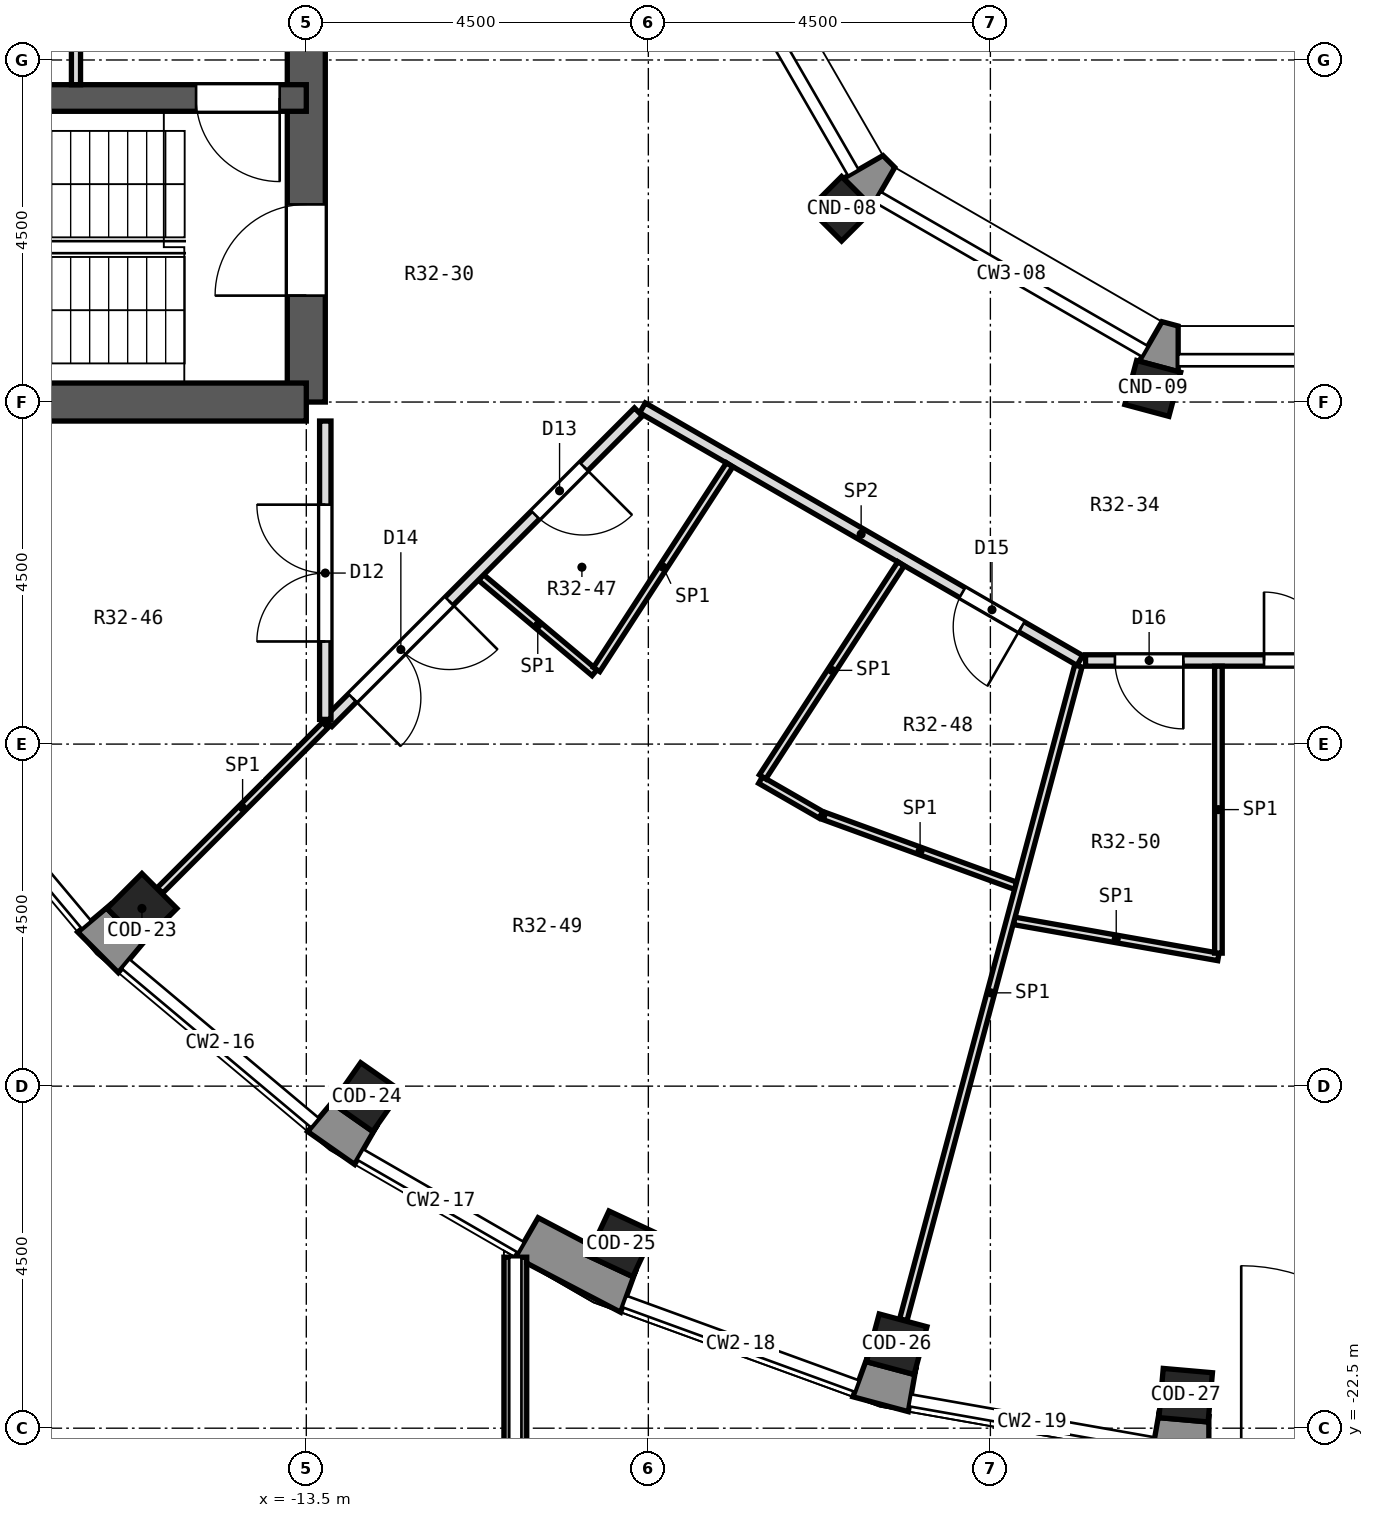
"""IFC4 building model, lengths in metres.
Left out: names, types, materials, properties, quantities, classifications, styles, units other than length and angle.
Written with IfcOpenShell. Run it as: python <this file> out.ifc"""

import sys

from ifc_helpers import new_model, si_unit, direction, frame, frame_2d, origin, origin_2d, place, context, subcontext, project, spatial, polyline, rectangle, outline, extrude, element, fill, save


model = new_model("IFC4")
c1 = context("Model", 3, precision=1e-05, world=origin(), true_north=direction((0.0, 1.0)))
c2 = subcontext(c1, "Body", "Model", "MODEL_VIEW")
j1 = project(units=[si_unit("LENGTHUNIT", "METRE"), si_unit("PLANEANGLEUNIT", "RADIAN")], contexts=[c1])
p1 = place(None, origin())
s1 = spatial("IfcSite", under=j1, at=p1, CompositionType="ELEMENT")
p2 = place(p1, origin())
s2 = spatial("IfcBuilding", under=s1, at=p2, CompositionType="ELEMENT")
p3 = place(p2, frame((0.0, 0.0, 224.7)))
s3 = spatial("IfcBuildingStorey", under=s2, at=p3, CompositionType="ELEMENT", Elevation=224.7)
p4 = place(p3, frame((-10.75, -29.512, 0.0), z_axis=(0.0, 0.0, 1.0), x_axis=(0.0, 1.0, 0.0)))
e1 = element("IfcWall", 1, at=p4, inside=s3, PredefinedType="SOLIDWALL", context=c2, shape_type="SweptSolid", body=[
    extrude(rectangle(XDim=9.262, YDim=0.3, at=frame_2d((4.631, 0.0))), origin(), (0.0, 0.0, 1.0), 1.7),
])
for number, where, z_axis, x_axis in (
    (2, (-15.662, -15.662, -0.55), (0.0, 0.0, 1.0), (-0.707, -0.707, 0.0)),
    (3, (-12.705, -18.144, -0.55), (0.0, 0.0, 1.0), (-0.574, -0.819, 0.0)),
):
    element("IfcColumn", number, at=place(p3, frame(where, z_axis=z_axis, x_axis=x_axis)), inside=s3, PredefinedType="COLUMN", context=c2, shape_type="SweptSolid", body=[
        extrude(rectangle(XDim=0.65, YDim=0.65, at=origin_2d()), origin(), (0.0, 0.0, 1.0), 5.55),
    ])
for number, where, z_axis, x_axis in (
    (4, (-9.361, -20.075, -1.15), (0.0, 0.0, 1.0), (-0.423, -0.906, 0.0)),
    (5, (-5.733, -21.395, -1.15), (0.0, 0.0, 1.0), (-0.259, -0.966, 0.0)),
    (6, (-1.93, -22.066, -1.15), (0.0, 0.0, 1.0), (-0.087, -0.996, 0.0)),
):
    element("IfcColumn", number, at=place(p3, frame(where, z_axis=z_axis, x_axis=x_axis)), inside=s3, PredefinedType="COLUMN", context=c2, shape_type="SweptSolid", body=[
        extrude(rectangle(XDim=0.65, YDim=0.65, at=origin_2d()), origin(), (0.0, 0.0, 1.0), 6.15),
    ])
for number, where, z_axis, x_axis in (
    (7, (-6.458, -6.458, 0.0), (0.0, 0.0, 1.0), (-0.707, -0.707, 0.0)),
    (8, (-2.364, -8.821, 0.0), (0.0, 0.0, 1.0), (-0.259, -0.966, 0.0)),
):
    element("IfcColumn", number, at=place(p3, frame(where, z_axis=z_axis, x_axis=x_axis)), inside=s3, PredefinedType="COLUMN", context=c2, shape_type="SweptSolid", body=[
        extrude(rectangle(XDim=0.6, YDim=0.6, at=origin_2d()), origin(), (0.0, 0.0, 1.0), 5.0),
    ])
p5 = place(p3, frame((-13.5, -9.0, 0.0), z_axis=(0.0, 0.0, 1.0), x_axis=(0.0, 1.0, 0.0)))
e9 = element("IfcWall", 9, at=p5, inside=s3, PredefinedType="SHEAR", context=c2, shape_type="SweptSolid", body=[
    extrude(rectangle(XDim=18.0, YDim=0.5, at=frame_2d((9.0, 0.0))), origin(), (0.0, 0.0, 1.0), 5.0),
])
p6 = place(p5, frame((15.4, 0.0, 0.0)))
e10 = element("IfcOpeningElement", 10, at=p6, cuts=e9, PredefinedType="OPENING", context=c2, shape_type="SweptSolid", body=[
    extrude(rectangle(XDim=1.2, YDim=2.1, at=frame_2d((0.6, 1.05))), frame((0.0, 0.262, 0.0), z_axis=(0.0, -1.0, 0.0), x_axis=(1.0, 0.0, 0.0)), (0.0, 0.0, 1.0), 0.524),
])
p7 = place(p5, frame((1.4, 0.0, 0.0)))
e11 = element("IfcOpeningElement", 11, at=p7, cuts=e9, PredefinedType="OPENING", context=c2, shape_type="SweptSolid", body=[
    extrude(rectangle(XDim=1.2, YDim=2.1, at=frame_2d((0.6, 1.05))), frame((0.0, 0.262, 0.0), z_axis=(0.0, -1.0, 0.0), x_axis=(1.0, 0.0, 0.0)), (0.0, 0.0, 1.0), 0.524),
])
p8 = place(p5, frame((7.5, 0.0, 0.0)))
e12 = element("IfcOpeningElement", 12, at=p8, cuts=e9, PredefinedType="OPENING", context=c2, shape_type="SweptSolid", body=[
    extrude(rectangle(XDim=3.0, YDim=2.4, at=frame_2d((1.5, 1.2))), frame((0.0, 0.262, 0.0), z_axis=(0.0, -1.0, 0.0), x_axis=(1.0, 0.0, 0.0)), (0.0, 0.0, 1.0), 0.524),
])
p9 = place(p3, frame((-13.5, -9.0, 0.0), z_axis=(0.0, 0.0, 1.0), x_axis=(-1.0, 0.0, 0.0)))
e13 = element("IfcWall", 13, at=p9, inside=s3, PredefinedType="SHEAR", context=c2, shape_type="SweptSolid", body=[
    extrude(rectangle(XDim=6.0, YDim=0.5, at=frame_2d((3.0, 0.0))), origin(), (0.0, 0.0, 1.0), 5.0),
])
p10 = place(p3, frame((-13.5, -5.0, 0.0), z_axis=(0.0, 0.0, 1.0), x_axis=(-1.0, 0.0, 0.0)))
e14 = element("IfcWall", 14, at=p10, inside=s3, PredefinedType="SHEAR", context=c2, shape_type="SweptSolid", body=[
    extrude(rectangle(XDim=6.0, YDim=0.35, at=frame_2d((3.0, 0.0))), origin(), (0.0, 0.0, 1.0), 5.0),
])
p11 = place(p10, frame((0.35, 0.0, 0.0)))
e15 = element("IfcOpeningElement", 15, at=p11, cuts=e14, PredefinedType="OPENING", context=c2, shape_type="SweptSolid", body=[
    extrude(rectangle(XDim=1.1, YDim=2.1, at=frame_2d((0.55, 1.05))), frame((0.0, 0.187, 0.0), z_axis=(0.0, -1.0, 0.0), x_axis=(1.0, 0.0, 0.0)), (0.0, 0.0, 1.0), 0.374),
])
p12 = place(p3, origin())
e16 = element("IfcWall", 16, at=p12, inside=s3, PredefinedType="SOLIDWALL", context=c2, shape_type="SweptSolid", body=[
    extrude(outline(polyline([(-15.973, -16.507), (-15.588, -16.047), (-15.662, -16.122), (-16.122, -15.662), (-16.047, -15.588), (-16.507, -15.973), (-15.973, -16.507)])), origin(), (0.0, 0.0, 1.0), 4.6),
])
p13 = place(p3, origin())
e17 = element("IfcWall", 17, at=p13, inside=s3, PredefinedType="SOLIDWALL", context=c2, shape_type="SweptSolid", body=[
    extrude(outline(polyline([(-12.864, -19.03), (-12.564, -18.51), (-12.625, -18.597), (-13.157, -18.224), (-13.097, -18.137), (-13.482, -18.597), (-12.864, -19.03)])), origin(), (0.0, 0.0, 1.0), 4.6),
])
p14 = place(p3, origin())
e18 = element("IfcWall", 18, at=p14, inside=s3, PredefinedType="SOLIDWALL", context=c2, shape_type="SweptSolid", body=[
    extrude(outline(polyline([(-10.45, -19.731), (-10.75, -20.25), (-10.6, -20.25), (-10.6, -20.329), (-9.364, -20.975), (-9.159, -20.411), (-9.204, -20.507), (-9.793, -20.232), (-9.735, -20.107), (-10.45, -19.731)])), origin(), (0.0, 0.0, 1.0), 4.6),
])
p15 = place(p3, origin())
e19 = element("IfcWall", 19, at=p15, inside=s3, PredefinedType="SOLIDWALL", context=c2, shape_type="SweptSolid", body=[
    extrude(outline(polyline([(-5.58, -22.282), (-5.476, -21.691), (-5.503, -21.793), (-6.131, -21.625), (-6.104, -21.523), (-6.309, -22.087), (-5.58, -22.282)])), origin(), (0.0, 0.0, 1.0), 4.6),
])
p16 = place(p3, origin())
e20 = element("IfcWall", 20, at=p16, inside=s3, PredefinedType="SOLIDWALL", context=c2, shape_type="SweptSolid", body=[
    extrude(outline(polyline([(-2.378, -22.847), (-1.626, -22.913), (-1.626, -22.312), (-1.635, -22.418), (-2.283, -22.361), (-2.273, -22.256), (-2.378, -22.847)])), origin(), (0.0, 0.0, 1.0), 4.6),
])
p17 = place(p3, origin())
e21 = element("IfcWall", 21, at=p17, inside=s3, PredefinedType="SOLIDWALL", context=c2, shape_type="SweptSolid", body=[
    extrude(outline(polyline([(-6.058, -6.433), (-5.758, -5.914), (-5.914, -5.758), (-6.433, -6.058), (-6.058, -6.433)])), origin(), (0.0, 0.0, 1.0), 4.6),
])
p18 = place(p3, origin())
e22 = element("IfcWall", 22, at=p18, inside=s3, PredefinedType="SOLIDWALL", context=c2, shape_type="SweptSolid", body=[
    extrude(outline(polyline([(-2.029, -8.6), (-2.029, -8.0), (-2.242, -7.943), (-2.542, -8.462), (-2.029, -8.6)])), origin(), (0.0, 0.0, 1.0), 4.6),
])
p19 = place(p3, frame((-11.202, -11.307, 0.0), z_axis=(0.0, 0.0, 1.0), x_axis=(0.765897191843, -0.642963056114, 0.0)))
e23 = element("IfcWall", 23, at=p19, inside=s3, PredefinedType="PARTITIONING", context=c2, shape_type="SweptSolid", body=[
    extrude(rectangle(XDim=1.95, YDim=0.1, at=frame_2d((0.975, 0.0))), origin(), (0.0, 0.0, 1.0), 4.6),
])
p20 = place(p3, frame((-9.077, -9.077, 0.0), z_axis=(0.0, 0.0, 1.0), x_axis=(0.865961614908, -0.500110469302, 0.0)))
e24 = element("IfcWall", 24, at=p20, inside=s3, PredefinedType="PARTITIONING", context=c2, shape_type="SweptSolid", body=[
    extrude(rectangle(XDim=6.645, YDim=0.15, at=frame_2d((3.322, 0.0))), origin(), (0.0, 0.0, 1.0), 4.6),
])
p21 = place(p20, frame((4.86, 0.0, 0.0)))
e25 = element("IfcOpeningElement", 25, at=p21, cuts=e24, PredefinedType="OPENING", context=c2, shape_type="SweptSolid", body=[
    extrude(rectangle(XDim=0.9, YDim=2.1, at=frame_2d((0.45, 1.05))), frame((0.0, 0.087, 0.0), z_axis=(0.0, -1.0, 0.0), x_axis=(1.0, 0.0, 0.0)), (0.0, 0.0, 1.0), 0.174),
])
p22 = place(p3, frame((-7.524, -13.973, 0.0), z_axis=(0.0, 0.0, 1.0), x_axis=(0.866468987099, -0.499230902886, 0.0)))
e26 = element("IfcWall", 26, at=p22, inside=s3, PredefinedType="PARTITIONING", context=c2, shape_type="SweptSolid", body=[
    extrude(rectangle(XDim=0.917, YDim=0.1, at=frame_2d((0.459, 0.0))), origin(), (0.0, 0.0, 1.0), 4.6),
])
p23 = place(p3, frame((-6.682, -14.448, 0.0), z_axis=(0.0, 0.0, 1.0), x_axis=(0.939569433945, -0.34235840693, 0.0)))
e27 = element("IfcWall", 27, at=p23, inside=s3, PredefinedType="PARTITIONING", context=c2, shape_type="SweptSolid", body=[
    extrude(rectangle(XDim=2.676, YDim=0.1, at=frame_2d((1.338, 0.0))), origin(), (0.0, 0.0, 1.0), 4.6),
])
p24 = place(p3, frame((-4.189, -15.826, 0.0), z_axis=(0.0, 0.0, 1.0), x_axis=(0.984790759644, -0.173744524288, 0.0)))
e28 = element("IfcWall", 28, at=p24, inside=s3, PredefinedType="PARTITIONING", context=c2, shape_type="SweptSolid", body=[
    extrude(rectangle(XDim=2.73, YDim=0.1, at=frame_2d((1.365, 0.0))), origin(), (0.0, 0.0, 1.0), 4.6),
])
p25 = place(p3, frame((-3.248, -12.4, 0.0), z_axis=(0.0, 0.0, 1.0), x_axis=(1.0, 0.0, 0.0)))
e29 = element("IfcWall", 29, at=p25, inside=s3, PredefinedType="PARTITIONING", context=c2, shape_type="SweptSolid", body=[
    extrude(rectangle(XDim=6.496, YDim=0.15, at=frame_2d((3.248, 0.0))), origin(), (0.0, 0.0, 1.0), 4.6),
])
p26 = place(p25, frame((0.386, 0.0, 0.0)))
e30 = element("IfcOpeningElement", 30, at=p26, cuts=e29, PredefinedType="OPENING", context=c2, shape_type="SweptSolid", body=[
    extrude(rectangle(XDim=0.9, YDim=2.1, at=frame_2d((0.45, 1.05))), frame((0.0, 0.087, 0.0), z_axis=(0.0, -1.0, 0.0), x_axis=(1.0, 0.0, 0.0)), (0.0, 0.0, 1.0), 0.174),
])
p27 = place(p25, frame((2.348, 0.0, 0.0)))
e31 = element("IfcOpeningElement", 31, at=p27, cuts=e29, PredefinedType="OPENING", context=c2, shape_type="SweptSolid", body=[
    extrude(rectangle(XDim=1.8, YDim=2.1, at=frame_2d((0.9, 1.05))), frame((0.0, 0.087, 0.0), z_axis=(0.0, -1.0, 0.0), x_axis=(1.0, 0.0, 0.0)), (0.0, 0.0, 1.0), 0.174),
])
p28 = place(p25, frame((5.209, 0.0, 0.0)))
e32 = element("IfcOpeningElement", 32, at=p28, cuts=e29, PredefinedType="OPENING", context=c2, shape_type="SweptSolid", body=[
    extrude(rectangle(XDim=0.9, YDim=2.1, at=frame_2d((0.45, 1.05))), frame((0.0, 0.087, 0.0), z_axis=(0.0, -1.0, 0.0), x_axis=(1.0, 0.0, 0.0)), (0.0, 0.0, 1.0), 0.174),
])
p29 = place(p3, frame((-15.426, -15.426, 0.0), z_axis=(0.0, 0.0, 1.0), x_axis=(0.707106781187, 0.707106781187, 0.0)))
e33 = element("IfcWall", 33, at=p29, inside=s3, PredefinedType="PARTITIONING", context=c2, shape_type="SweptSolid", body=[
    extrude(rectangle(XDim=3.077, YDim=0.1, at=frame_2d((1.538, 0.0))), origin(), (0.0, 0.0, 1.0), 4.6),
])
p30 = place(p3, frame((-13.215, -13.215, 0.0), z_axis=(0.0, 0.0, 1.0), x_axis=(0.707106781187, 0.707106781187, 0.0)))
e34 = element("IfcWall", 34, at=p30, inside=s3, PredefinedType="PARTITIONING", context=c2, shape_type="SweptSolid", body=[
    extrude(rectangle(XDim=5.777, YDim=0.15, at=frame_2d((2.888, 0.0))), origin(), (0.0, 0.0, 1.0), 4.6),
])
p31 = place(p30, frame((3.859, 0.0, 0.0)))
e35 = element("IfcOpeningElement", 35, at=p31, cuts=e34, PredefinedType="OPENING", context=c2, shape_type="SweptSolid", body=[
    extrude(rectangle(XDim=0.9, YDim=2.1, at=frame_2d((0.45, 1.05))), frame((0.0, 0.087, 0.0), z_axis=(0.0, -1.0, 0.0), x_axis=(1.0, 0.0, 0.0)), (0.0, 0.0, 1.0), 0.174),
])
p32 = place(p30, frame((0.456, 0.0, 0.0)))
e36 = element("IfcOpeningElement", 36, at=p32, cuts=e34, PredefinedType="OPENING", context=c2, shape_type="SweptSolid", body=[
    extrude(rectangle(XDim=1.8, YDim=2.1, at=frame_2d((0.9, 1.05))), frame((0.0, 0.087, 0.0), z_axis=(0.0, -1.0, 0.0), x_axis=(1.0, 0.0, 0.0)), (0.0, 0.0, 1.0), 0.174),
])
p33 = place(p3, frame((-7.497, -13.931, 0.0), z_axis=(0.0, 0.0, 1.0), x_axis=(0.54476755827, 0.838587089966, 0.0)))
e37 = element("IfcWall", 37, at=p33, inside=s3, PredefinedType="PARTITIONING", context=c2, shape_type="SweptSolid", body=[
    extrude(rectangle(XDim=3.343, YDim=0.1, at=frame_2d((1.671, 0.0))), origin(), (0.0, 0.0, 1.0), 4.6),
])
p34 = place(p3, frame((-9.681, -12.519, 0.0), z_axis=(0.0, 0.0, 1.0), x_axis=(0.544873455053, 0.838518287206, 0.0)))
e38 = element("IfcWall", 38, at=p34, inside=s3, PredefinedType="PARTITIONING", context=c2, shape_type="SweptSolid", body=[
    extrude(rectangle(XDim=3.212, YDim=0.1, at=frame_2d((1.606, 0.0))), origin(), (0.0, 0.0, 1.0), 4.6),
])
p35 = place(p3, frame((-5.645, -21.072, 0.0), z_axis=(0.0, 0.0, 1.0), x_axis=(0.258659321195, 0.965968610028, 0.0)))
e39 = element("IfcWall", 39, at=p35, inside=s3, PredefinedType="PARTITIONING", context=c2, shape_type="SweptSolid", body=[
    extrude(rectangle(XDim=8.903, YDim=0.1, at=frame_2d((4.451, 0.0))), origin(), (0.0, 0.0, 1.0), 4.6),
])
p36 = place(p3, frame((-1.5, -16.25, 0.0), z_axis=(0.0, 0.0, 1.0), x_axis=(0.0, 1.0, 0.0)))
e40 = element("IfcWall", 40, at=p36, inside=s3, PredefinedType="PARTITIONING", context=c2, shape_type="SweptSolid", body=[
    extrude(rectangle(XDim=3.775, YDim=0.1, at=frame_2d((1.887, 0.0))), origin(), (0.0, 0.0, 1.0), 4.6),
])
p37 = place(p3, frame((-13.25, -13.175, 0.0), z_axis=(0.0, 0.0, 1.0), x_axis=(0.0, 1.0, 0.0)))
e41 = element("IfcWall", 41, at=p37, inside=s3, PredefinedType="PARTITIONING", context=c2, shape_type="SweptSolid", body=[
    extrude(rectangle(XDim=3.925, YDim=0.15, at=frame_2d((1.962, 0.0))), origin(), (0.0, 0.0, 1.0), 4.6),
])
p38 = place(p37, frame((1.025, 0.0, 0.0)))
e42 = element("IfcOpeningElement", 42, at=p38, cuts=e41, PredefinedType="OPENING", context=c2, shape_type="SweptSolid", body=[
    extrude(rectangle(XDim=1.8, YDim=2.1, at=frame_2d((0.9, 1.05))), frame((0.0, 0.087, 0.0), z_axis=(0.0, -1.0, 0.0), x_axis=(1.0, 0.0, 0.0)), (0.0, 0.0, 1.0), 0.174),
])
p39 = place(p3, frame((-16.53, -4.825, 0.0), z_axis=(0.0, 0.0, 1.0), x_axis=(0.0, 1.0, 0.0)))
e43 = element("IfcWall", 43, at=p39, inside=s3, PredefinedType="PARTITIONING", context=c2, shape_type="SweptSolid", body=[
    extrude(rectangle(XDim=2.65, YDim=0.12, at=frame_2d((1.325, 0.0))), origin(), (0.0, 0.0, 1.0), 4.6),
])
p40 = place(p39, frame((0.775, 0.0, 0.0)))
e44 = element("IfcOpeningElement", 44, at=p40, cuts=e43, PredefinedType="OPENING", context=c2, shape_type="SweptSolid", body=[
    extrude(rectangle(XDim=1.1, YDim=2.1, at=frame_2d((0.55, 1.05))), frame((0.0, 0.072, 0.0), z_axis=(0.0, -1.0, 0.0), x_axis=(1.0, 0.0, 0.0)), (0.0, 0.0, 1.0), 0.144),
])
p41 = place(p38, origin())
e45 = element("IfcDoor", 45, at=p41, inside=s3, OperationType="DOUBLE_DOOR_SINGLE_SWING", PredefinedType="DOOR", context=c2, shape_type="SweptSolid", body=[
    extrude(rectangle(XDim=1.8, YDim=2.1, at=frame_2d((0.9, 1.05))), frame((0.0, 0.025, 0.0), z_axis=(0.0, -1.0, 0.0), x_axis=(1.0, 0.0, 0.0)), (0.0, 0.0, 1.0), 0.05),
])
fill(e42, e45)
p42 = place(p31, frame((0.9, 0.0, 0.0), z_axis=(0.0, 0.0, 1.0), x_axis=(-1.0, 0.0, 0.0)))
e46 = element("IfcDoor", 46, at=p42, inside=s3, OperationType="SINGLE_SWING_LEFT", PredefinedType="DOOR", context=c2, shape_type="SweptSolid", body=[
    extrude(rectangle(XDim=0.9, YDim=2.1, at=frame_2d((0.45, 1.05))), frame((0.0, 0.025, 0.0), z_axis=(0.0, -1.0, 0.0), x_axis=(1.0, 0.0, 0.0)), (0.0, 0.0, 1.0), 0.05),
])
fill(e35, e46)
p43 = place(p32, frame((1.8, 0.0, 0.0), z_axis=(0.0, 0.0, 1.0), x_axis=(-1.0, 0.0, 0.0)))
e47 = element("IfcDoor", 47, at=p43, inside=s3, OperationType="DOUBLE_DOOR_SINGLE_SWING", PredefinedType="DOOR", context=c2, shape_type="SweptSolid", body=[
    extrude(rectangle(XDim=1.8, YDim=2.1, at=frame_2d((0.9, 1.05))), frame((0.0, 0.025, 0.0), z_axis=(0.0, -1.0, 0.0), x_axis=(1.0, 0.0, 0.0)), (0.0, 0.0, 1.0), 0.05),
])
fill(e36, e47)
p44 = place(p21, frame((0.9, 0.0, 0.0), z_axis=(0.0, 0.0, 1.0), x_axis=(-1.0, 0.0, 0.0)))
e48 = element("IfcDoor", 48, at=p44, inside=s3, OperationType="SINGLE_SWING_LEFT", PredefinedType="DOOR", context=c2, shape_type="SweptSolid", body=[
    extrude(rectangle(XDim=0.9, YDim=2.1, at=frame_2d((0.45, 1.05))), frame((0.0, 0.025, 0.0), z_axis=(0.0, -1.0, 0.0), x_axis=(1.0, 0.0, 0.0)), (0.0, 0.0, 1.0), 0.05),
])
fill(e25, e48)
p45 = place(p26, frame((0.9, 0.0, 0.0), z_axis=(0.0, 0.0, 1.0), x_axis=(-1.0, 0.0, 0.0)))
e49 = element("IfcDoor", 49, at=p45, inside=s3, OperationType="SINGLE_SWING_LEFT", PredefinedType="DOOR", context=c2, shape_type="SweptSolid", body=[
    extrude(rectangle(XDim=0.9, YDim=2.1, at=frame_2d((0.45, 1.05))), frame((0.0, 0.025, 0.0), z_axis=(0.0, -1.0, 0.0), x_axis=(1.0, 0.0, 0.0)), (0.0, 0.0, 1.0), 0.05),
])
fill(e30, e49)
p46 = place(p27, origin())
e50 = element("IfcDoor", 50, at=p46, inside=s3, OperationType="DOUBLE_DOOR_SINGLE_SWING", PredefinedType="DOOR", context=c2, shape_type="SweptSolid", body=[
    extrude(rectangle(XDim=1.8, YDim=2.1, at=frame_2d((0.9, 1.05))), frame((0.0, 0.025, 0.0), z_axis=(0.0, -1.0, 0.0), x_axis=(1.0, 0.0, 0.0)), (0.0, 0.0, 1.0), 0.05),
])
fill(e31, e50)
p47 = place(p11, origin())
e51 = element("IfcDoor", 51, at=p47, inside=s3, OperationType="SINGLE_SWING_LEFT", PredefinedType="DOOR", context=c2, shape_type="SweptSolid", body=[
    extrude(rectangle(XDim=1.1, YDim=2.1, at=frame_2d((0.55, 1.05))), frame((0.0, 0.025, 0.0), z_axis=(0.0, -1.0, 0.0), x_axis=(1.0, 0.0, 0.0)), (0.0, 0.0, 1.0), 0.05),
])
fill(e15, e51)
p48 = place(p7, origin())
e52 = element("IfcDoor", 52, at=p48, inside=s3, OperationType="SINGLE_SWING_LEFT", PredefinedType="DOOR", context=c2, shape_type="SweptSolid", body=[
    extrude(rectangle(XDim=1.2, YDim=2.1, at=frame_2d((0.6, 1.05))), frame((0.0, 0.025, 0.0), z_axis=(0.0, -1.0, 0.0), x_axis=(1.0, 0.0, 0.0)), (0.0, 0.0, 1.0), 0.05),
])
fill(e11, e52)
save(model, sys.argv[1])
